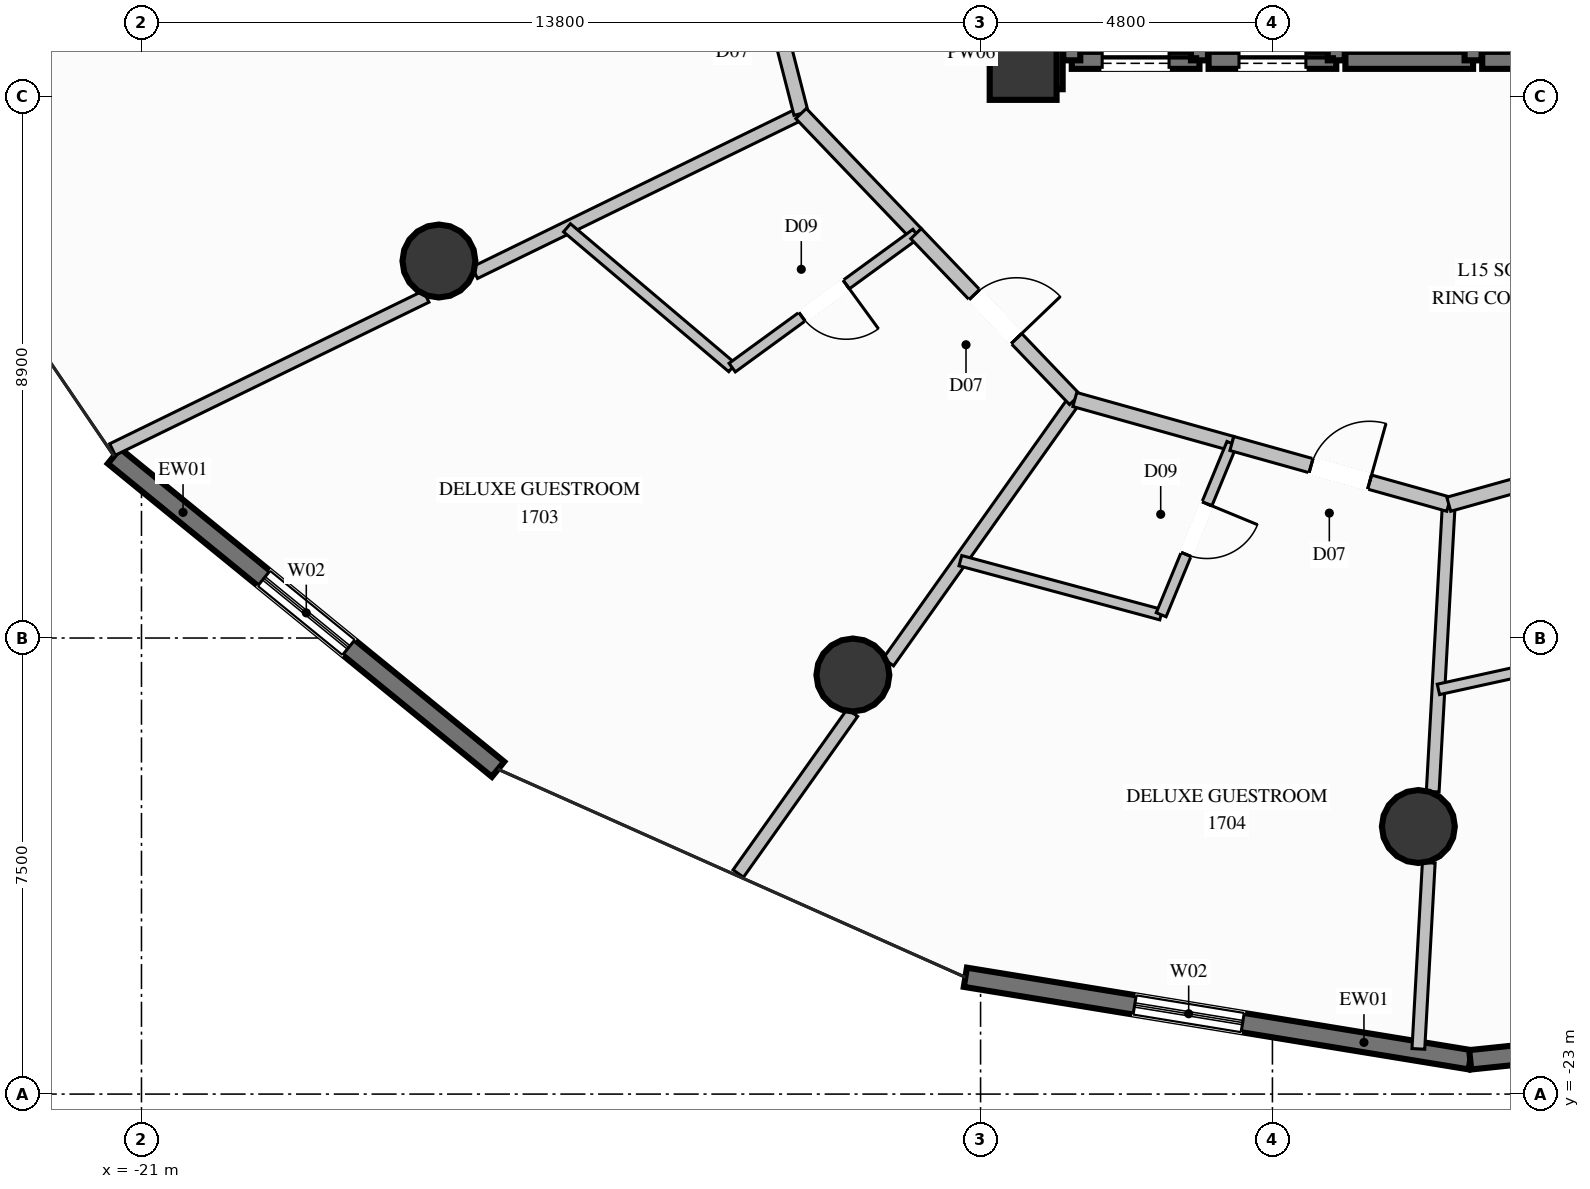
"""IFC4 building model, lengths in metres.
Left out: names, types, materials, properties, quantities, classifications, styles, units other than length and angle.
Written with IfcOpenShell. Run it as: python <this file> out.ifc"""

import sys

from ifc_helpers import new_model, si_unit, direction, frame, frame_2d, origin, origin_2d, place, context, subcontext, project, spatial, rectangle, circle, extrude, element, fill, save


model = new_model("IFC4")
c1 = context("Model", 3, precision=1e-05, world=origin(), true_north=direction((0.0, 1.0)))
c2 = subcontext(c1, "Body", "Model", "MODEL_VIEW")
j1 = project(units=[si_unit("LENGTHUNIT", "METRE"), si_unit("PLANEANGLEUNIT", "RADIAN")], contexts=[c1])
p1 = place(None, origin())
s1 = spatial("IfcSite", under=j1, at=p1, CompositionType="ELEMENT")
p2 = place(p1, origin())
s2 = spatial("IfcBuilding", under=s1, at=p2, CompositionType="ELEMENT")
p3 = place(p2, frame((0.0, 0.0, 64.4)))
s3 = spatial("IfcBuildingStorey", under=s2, at=p3, CompositionType="ELEMENT", Elevation=64.4)
p4 = place(p3, frame((-6.5, -6.1, 0.0), z_axis=(0.0, 0.0, 1.0), x_axis=(1.0, 0.0, 0.0)))
e1 = element("IfcColumn", 1, at=p4, inside=s3, PredefinedType="COLUMN", context=c2, shape_type="SweptSolid", body=[
    extrude(rectangle(XDim=1.1, YDim=1.1, at=origin_2d()), origin(), (0.0, 0.0, 1.0), 3.6),
])
p5 = place(p3, frame((-6.125, -6.1, 0.0), z_axis=(0.0, 0.0, 1.0), x_axis=(1.0, 0.0, 0.0)))
e2 = element("IfcWall", 2, at=p5, inside=s3, PredefinedType="SHEAR", context=c2, shape_type="SweptSolid", body=[
    extrude(rectangle(XDim=0.275, YDim=0.75, at=frame_2d((0.137, 0.0))), origin(), (0.0, 0.0, 1.0), 3.6),
])
p6 = place(p3, frame((-6.5, -6.475, 0.0), z_axis=(0.0, 0.0, 1.0), x_axis=(0.0, 1.0, 0.0)))
e3 = element("IfcWall", 3, at=p6, inside=s3, PredefinedType="SHEAR", context=c2, shape_type="SweptSolid", body=[
    extrude(rectangle(XDim=3.125, YDim=0.75, at=frame_2d((1.562, 0.0))), origin(), (0.0, 0.0, 1.0), 3.6),
])
for number, where, z_axis, x_axis in (
    (4, (-16.108, -9.3, 0.0), (0.0, 0.0, 1.0), (1.0, 0.0, 0.0)),
    (5, (-9.3, -16.108, 0.0), (0.0, 0.0, 1.0), (1.0, 0.0, 0.0)),
    (6, (0.0, -18.6, 0.0), (0.0, 0.0, 1.0), (1.0, 0.0, 0.0)),
):
    element("IfcColumn", number, at=place(p3, frame(where, z_axis=z_axis, x_axis=x_axis)), inside=s3, PredefinedType="COLUMN", context=c2, shape_type="SweptSolid", body=[
        extrude(circle(Radius=0.6, at=origin_2d()), origin(), (0.0, 0.0, 1.0), 3.6),
    ])
p7 = place(p3, frame((-15.136, -17.658, 0.0), z_axis=(0.0, 0.0, 1.0), x_axis=(-0.775018687806, 0.631938314673, 0.0)))
e7 = element("IfcWall", 7, at=p7, inside=s3, PredefinedType="SOLIDWALL", context=c2, shape_type="SweptSolid", body=[
    extrude(rectangle(XDim=8.149, YDim=0.32, at=frame_2d((4.075, 0.0))), origin(), (0.0, 0.0, 1.0), 3.34),
])
p8 = place(p7, frame((3.169, 0.0, 0.35)))
e8 = element("IfcOpeningElement", 8, at=p8, cuts=e7, PredefinedType="OPENING", context=c2, shape_type="SweptSolid", body=[
    extrude(rectangle(XDim=1.8, YDim=2.6, at=frame_2d((0.9, 1.3))), frame((0.0, 0.17, 0.0), z_axis=(0.0, -1.0, 0.0), x_axis=(1.0, 0.0, 0.0)), (0.0, 0.0, 1.0), 0.34),
])
p9 = place(p3, frame((0.853, -22.436, 0.0), z_axis=(0.0, 0.0, 1.0), x_axis=(-0.986907440065, 0.161287645973, 0.0)))
e9 = element("IfcWall", 9, at=p9, inside=s3, PredefinedType="SOLIDWALL", context=c2, shape_type="SweptSolid", body=[
    extrude(rectangle(XDim=8.413, YDim=0.32, at=frame_2d((4.207, 0.0))), origin(), (0.0, 0.0, 1.0), 3.34),
])
p10 = place(p9, frame((3.792, 0.0, 0.35)))
e10 = element("IfcOpeningElement", 10, at=p10, cuts=e9, PredefinedType="OPENING", context=c2, shape_type="SweptSolid", body=[
    extrude(rectangle(XDim=1.8, YDim=2.6, at=frame_2d((0.9, 1.3))), frame((0.0, 0.17, 0.0), z_axis=(0.0, -1.0, 0.0), x_axis=(1.0, 0.0, 0.0)), (0.0, 0.0, 1.0), 0.34),
])
p11 = place(p3, frame((8.959, -21.598, 0.0), z_axis=(0.0, 0.0, 1.0), x_axis=(-0.994696973701, -0.102849066644, 0.0)))
e11 = element("IfcWall", 11, at=p11, inside=s3, PredefinedType="SOLIDWALL", context=c2, shape_type="SweptSolid", body=[
    extrude(rectangle(XDim=8.149, YDim=0.32, at=frame_2d((4.075, 0.0))), origin(), (0.0, 0.0, 1.0), 3.34),
])
p12 = place(p11, frame((3.175, 0.0, 0.35)))
e12 = element("IfcOpeningElement", 12, at=p12, cuts=e11, PredefinedType="OPENING", context=c2, shape_type="SweptSolid", body=[
    extrude(rectangle(XDim=1.8, YDim=2.6, at=frame_2d((0.9, 1.3))), frame((0.0, 0.17, 0.0), z_axis=(0.0, -1.0, 0.0), x_axis=(1.0, 0.0, 0.0)), (0.0, 0.0, 1.0), 0.34),
])
p13 = place(p3, frame((-5.7, -6.0, 0.0), z_axis=(0.0, 0.0, 1.0), x_axis=(1.0, 0.0, 0.0)))
e13 = element("IfcWall", 13, at=p13, inside=s3, PredefinedType="SOLIDWALL", context=c2, shape_type="SweptSolid", body=[
    extrude(rectangle(XDim=2.1, YDim=0.28, at=frame_2d((1.05, 0.0))), origin(), (0.0, 0.0, 1.0), 3.34),
])
p14 = place(p13, frame((0.5, 0.0, 0.0)))
e14 = element("IfcOpeningElement", 14, at=p14, cuts=e13, PredefinedType="OPENING", context=c2, shape_type="SweptSolid", body=[
    extrude(rectangle(XDim=1.1, YDim=2.2, at=frame_2d((0.55, 1.1))), frame((0.0, 0.15, 0.0), z_axis=(0.0, -1.0, 0.0), x_axis=(1.0, 0.0, 0.0)), (0.0, 0.0, 1.0), 0.3),
])
for number, where, z_axis, x_axis in (
    (15, (-5.7, -3.5, 0.0), (0.0, 0.0, 1.0), (0.0, -1.0, 0.0)),
    (16, (-3.6, -6.0, 0.0), (0.0, 0.0, 1.0), (0.0, 1.0, 0.0)),
):
    element("IfcWall", number, at=place(p3, frame(where, z_axis=z_axis, x_axis=x_axis)), inside=s3, PredefinedType="SOLIDWALL", context=c2, shape_type="SweptSolid", body=[
        extrude(rectangle(XDim=2.5, YDim=0.28, at=frame_2d((1.25, 0.0))), origin(), (0.0, 0.0, 1.0), 3.34),
    ])
p15 = place(p3, frame((-3.45, -6.0, 0.0), z_axis=(0.0, 0.0, 1.0), x_axis=(1.0, 0.0, 0.0)))
e17 = element("IfcWall", 17, at=p15, inside=s3, PredefinedType="SOLIDWALL", context=c2, shape_type="SweptSolid", body=[
    extrude(rectangle(XDim=2.1, YDim=0.28, at=frame_2d((1.05, 0.0))), origin(), (0.0, 0.0, 1.0), 3.34),
])
p16 = place(p15, frame((0.5, 0.0, 0.0)))
e18 = element("IfcOpeningElement", 18, at=p16, cuts=e17, PredefinedType="OPENING", context=c2, shape_type="SweptSolid", body=[
    extrude(rectangle(XDim=1.1, YDim=2.2, at=frame_2d((0.55, 1.1))), frame((0.0, 0.15, 0.0), z_axis=(0.0, -1.0, 0.0), x_axis=(1.0, 0.0, 0.0)), (0.0, 0.0, 1.0), 0.3),
])
p17 = place(p3, frame((-1.35, -6.0, 0.0), z_axis=(0.0, 0.0, 1.0), x_axis=(0.0, 1.0, 0.0)))
e19 = element("IfcWall", 19, at=p17, inside=s3, PredefinedType="SOLIDWALL", context=c2, shape_type="SweptSolid", body=[
    extrude(rectangle(XDim=2.5, YDim=0.28, at=frame_2d((1.25, 0.0))), origin(), (0.0, 0.0, 1.0), 3.34),
])
p18 = place(p3, frame((-1.2, -6.0, 0.0), z_axis=(0.0, 0.0, 1.0), x_axis=(1.0, 0.0, 0.0)))
e20 = element("IfcWall", 20, at=p18, inside=s3, PredefinedType="SOLIDWALL", context=c2, shape_type="SweptSolid", body=[
    extrude(rectangle(XDim=2.1, YDim=0.28, at=frame_2d((1.05, 0.0))), origin(), (0.0, 0.0, 1.0), 3.34),
])
p19 = place(p3, frame((0.9, -6.0, 0.0), z_axis=(0.0, 0.0, 1.0), x_axis=(0.0, 1.0, 0.0)))
e21 = element("IfcWall", 21, at=p19, inside=s3, PredefinedType="SOLIDWALL", context=c2, shape_type="SweptSolid", body=[
    extrude(rectangle(XDim=2.5, YDim=0.28, at=frame_2d((1.25, 0.0))), origin(), (0.0, 0.0, 1.0), 3.34),
])
p20 = place(p3, frame((1.05, -6.0, 0.0), z_axis=(0.0, 0.0, 1.0), x_axis=(1.0, 0.0, 0.0)))
e22 = element("IfcWall", 22, at=p20, inside=s3, PredefinedType="SOLIDWALL", context=c2, shape_type="SweptSolid", body=[
    extrude(rectangle(XDim=2.1, YDim=0.28, at=frame_2d((1.05, 0.0))), origin(), (0.0, 0.0, 1.0), 3.34),
])
p21 = place(p3, frame((-10.152, -6.875, 0.0), z_axis=(0.0, 0.0, 1.0), x_axis=(-0.898775125454, -0.438409938145, 0.0)))
e23 = element("IfcWall", 23, at=p21, inside=s3, PredefinedType="PARTITIONING", context=c2, shape_type="SweptSolid", body=[
    extrude(rectangle(XDim=5.971, YDim=0.21, at=frame_2d((2.986, 0.0))), origin(), (0.0, 0.0, 1.0), 2.708),
])
p22 = place(p3, frame((-16.318, -9.883, 0.0), z_axis=(0.0, 0.0, 1.0), x_axis=(-0.898748415115, -0.438464692226, 0.0)))
e24 = element("IfcWall", 24, at=p22, inside=s3, PredefinedType="PARTITIONING", context=c2, shape_type="SweptSolid", body=[
    extrude(rectangle(XDim=5.74, YDim=0.21, at=frame_2d((2.87, 0.0))), origin(), (0.0, 0.0, 1.0), 3.34),
])
p23 = place(p3, frame((-5.65, -11.578, 0.0), z_axis=(0.0, 0.0, 1.0), x_axis=(-0.578995149059, -0.815330986389, 0.0)))
e25 = element("IfcWall", 25, at=p23, inside=s3, PredefinedType="PARTITIONING", context=c2, shape_type="SweptSolid", body=[
    extrude(rectangle(XDim=5.297, YDim=0.21, at=frame_2d((2.649, 0.0))), origin(), (0.0, 0.0, 1.0), 2.708),
])
p24 = place(p3, frame((-9.307, -16.728, 0.0), z_axis=(0.0, 0.0, 1.0), x_axis=(-0.578964948961, -0.815352431697, 0.0)))
e26 = element("IfcWall", 26, at=p24, inside=s3, PredefinedType="PARTITIONING", context=c2, shape_type="SweptSolid", body=[
    extrude(rectangle(XDim=3.244, YDim=0.21, at=frame_2d((1.622, 0.0))), origin(), (0.0, 0.0, 1.0), 3.34),
])
p25 = place(p3, frame((0.5, -13.3, 0.0), z_axis=(0.0, 0.0, 1.0), x_axis=(-0.05574419663, -0.998445083388, 0.0)))
e27 = element("IfcWall", 27, at=p25, inside=s3, PredefinedType="PARTITIONING", context=c2, shape_type="SweptSolid", body=[
    extrude(rectangle(XDim=4.734, YDim=0.21, at=frame_2d((2.367, 0.0))), origin(), (0.0, 0.0, 1.0), 3.34),
])
p26 = place(p3, frame((0.171, -19.196, 0.0), z_axis=(0.0, 0.0, 1.0), x_axis=(-0.055743466812, -0.998445124134, 0.0)))
e28 = element("IfcWall", 28, at=p26, inside=s3, PredefinedType="PARTITIONING", context=c2, shape_type="SweptSolid", body=[
    extrude(rectangle(XDim=3.066, YDim=0.21, at=frame_2d((1.533, 0.0))), origin(), (0.0, 0.0, 1.0), 3.34),
])
p27 = place(p3, frame((-11.108, -3.148, 0.0), z_axis=(0.0, 0.0, 1.0), x_axis=(0.248413515056, -0.9686540794, 0.0)))
e29 = element("IfcWall", 29, at=p27, inside=s3, PredefinedType="PARTITIONING", context=c2, shape_type="SweptSolid", body=[
    extrude(rectangle(XDim=3.848, YDim=0.24, at=frame_2d((1.924, 0.0))), origin(), (0.0, 0.0, 1.0), 3.34),
])
p28 = place(p27, frame((1.424, 0.0, 0.0)))
e30 = element("IfcOpeningElement", 30, at=p28, cuts=e29, PredefinedType="OPENING", context=c2, shape_type="SweptSolid", body=[
    extrude(rectangle(XDim=1.0, YDim=2.2, at=frame_2d((0.5, 1.1))), frame((0.0, 0.13, 0.0), z_axis=(0.0, -1.0, 0.0), x_axis=(1.0, 0.0, 0.0)), (0.0, 0.0, 1.0), 0.26),
])
p29 = place(p3, frame((-10.152, -6.875, 0.0), z_axis=(0.0, 0.0, 1.0), x_axis=(0.691583392139, -0.722296623083, 0.0)))
e31 = element("IfcWall", 31, at=p29, inside=s3, PredefinedType="PARTITIONING", context=c2, shape_type="SweptSolid", body=[
    extrude(rectangle(XDim=2.734, YDim=0.24, at=frame_2d((1.367, 0.0))), origin(), (0.0, 0.0, 1.0), 3.34),
])
p30 = place(p3, frame((-14.002, -8.754, 0.0), z_axis=(0.0, 0.0, 1.0), x_axis=(0.763381081672, -0.64594839124, 0.0)))
e32 = element("IfcWall", 32, at=p30, inside=s3, PredefinedType="PLUMBINGWALL", context=c2, shape_type="SweptSolid", body=[
    extrude(rectangle(XDim=3.559, YDim=0.175, at=frame_2d((1.78, 0.0))), origin(), (0.0, 0.0, 1.0), 3.34),
])
p31 = place(p3, frame((-8.261, -8.85, 0.0), z_axis=(0.0, 0.0, 1.0), x_axis=(-0.8082702151, -0.588811735092, 0.0)))
e33 = element("IfcWall", 33, at=p31, inside=s3, PredefinedType="PLUMBINGWALL", context=c2, shape_type="SweptSolid", body=[
    extrude(rectangle(XDim=3.741, YDim=0.175, at=frame_2d((1.871, 0.0))), origin(), (0.0, 0.0, 1.0), 3.34),
])
p32 = place(p31, frame((1.421, 0.0, 0.0)))
e34 = element("IfcOpeningElement", 34, at=p32, cuts=e33, PredefinedType="OPENING", context=c2, shape_type="SweptSolid", body=[
    extrude(rectangle(XDim=0.9, YDim=2.1, at=frame_2d((0.45, 1.05))), frame((0.0, 0.098, 0.0), z_axis=(0.0, -1.0, 0.0), x_axis=(1.0, 0.0, 0.0)), (0.0, 0.0, 1.0), 0.195),
])
p33 = place(p3, frame((-8.261, -8.85, 0.0), z_axis=(0.0, 0.0, 1.0), x_axis=(0.691485368968, -0.722390465402, 0.0)))
e35 = element("IfcWall", 35, at=p33, inside=s3, PredefinedType="PARTITIONING", context=c2, shape_type="SweptSolid", body=[
    extrude(rectangle(XDim=3.776, YDim=0.24, at=frame_2d((1.888, 0.0))), origin(), (0.0, 0.0, 1.0), 3.34),
])
p34 = place(p33, frame((1.388, 0.0, 0.0)))
e36 = element("IfcOpeningElement", 36, at=p34, cuts=e35, PredefinedType="OPENING", context=c2, shape_type="SweptSolid", body=[
    extrude(rectangle(XDim=1.0, YDim=2.2, at=frame_2d((0.5, 1.1))), frame((0.0, 0.13, 0.0), z_axis=(0.0, -1.0, 0.0), x_axis=(1.0, 0.0, 0.0)), (0.0, 0.0, 1.0), 0.26),
])
p35 = place(p3, frame((-5.65, -11.578, 0.0), z_axis=(0.0, 0.0, 1.0), x_axis=(0.96297347206, -0.269596164862, 0.0)))
e37 = element("IfcWall", 37, at=p35, inside=s3, PredefinedType="PARTITIONING", context=c2, shape_type="SweptSolid", body=[
    extrude(rectangle(XDim=2.682, YDim=0.24, at=frame_2d((1.341, 0.0))), origin(), (0.0, 0.0, 1.0), 2.917),
])
p36 = place(p3, frame((-7.532, -14.228, 0.0), z_axis=(0.0, 0.0, 1.0), x_axis=(0.965621962254, -0.259950429913, 0.0)))
e38 = element("IfcWall", 38, at=p36, inside=s3, PredefinedType="PLUMBINGWALL", context=c2, shape_type="SweptSolid", body=[
    extrude(rectangle(XDim=3.42, YDim=0.175, at=frame_2d((1.71, 0.0))), origin(), (0.0, 0.0, 1.0), 3.34),
])
p37 = place(p3, frame((-3.067, -12.301, 0.0), z_axis=(0.0, 0.0, 1.0), x_axis=(-0.381757178114, -0.924262655828, 0.0)))
e39 = element("IfcWall", 39, at=p37, inside=s3, PredefinedType="PLUMBINGWALL", context=c2, shape_type="SweptSolid", body=[
    extrude(rectangle(XDim=3.047, YDim=0.175, at=frame_2d((1.523, 0.0))), origin(), (0.0, 0.0, 1.0), 3.34),
])
p38 = place(p37, frame((1.073, 0.0, 0.0)))
e40 = element("IfcOpeningElement", 40, at=p38, cuts=e39, PredefinedType="OPENING", context=c2, shape_type="SweptSolid", body=[
    extrude(rectangle(XDim=0.9, YDim=2.1, at=frame_2d((0.45, 1.05))), frame((0.0, 0.098, 0.0), z_axis=(0.0, -1.0, 0.0), x_axis=(1.0, 0.0, 0.0)), (0.0, 0.0, 1.0), 0.195),
])
p39 = place(p3, frame((-3.067, -12.301, 0.0), z_axis=(0.0, 0.0, 1.0), x_axis=(0.962943481199, -0.269703266603, 0.0)))
e41 = element("IfcWall", 41, at=p39, inside=s3, PredefinedType="PARTITIONING", context=c2, shape_type="SweptSolid", body=[
    extrude(rectangle(XDim=3.704, YDim=0.24, at=frame_2d((1.852, 0.0))), origin(), (0.0, 0.0, 1.0), 2.917),
])
p40 = place(p39, frame((1.352, 0.0, 0.0)))
e42 = element("IfcOpeningElement", 42, at=p40, cuts=e41, PredefinedType="OPENING", context=c2, shape_type="SweptSolid", body=[
    extrude(rectangle(XDim=1.0, YDim=2.2, at=frame_2d((0.5, 1.1))), frame((0.0, 0.13, 0.0), z_axis=(0.0, -1.0, 0.0), x_axis=(1.0, 0.0, 0.0)), (0.0, 0.0, 1.0), 0.26),
])
p41 = place(p3, frame((0.5, -13.3, 0.0), z_axis=(0.0, 0.0, 1.0), x_axis=(0.96297347206, 0.269596164862, 0.0)))
e43 = element("IfcWall", 43, at=p41, inside=s3, PredefinedType="PARTITIONING", context=c2, shape_type="SweptSolid", body=[
    extrude(rectangle(XDim=2.682, YDim=0.24, at=frame_2d((1.341, 0.0))), origin(), (0.0, 0.0, 1.0), 3.34),
])
p42 = place(p3, frame((0.33, -16.345, 0.0), z_axis=(0.0, 0.0, 1.0), x_axis=(0.976706198213, 0.21458099257, 0.0)))
e44 = element("IfcWall", 44, at=p42, inside=s3, PredefinedType="PLUMBINGWALL", context=c2, shape_type="SweptSolid", body=[
    extrude(rectangle(XDim=3.467, YDim=0.175, at=frame_2d((1.733, 0.0))), origin(), (0.0, 0.0, 1.0), 3.34),
])
p43 = place(p8, origin())
e45 = element("IfcWindow", 45, at=p43, inside=s3, PartitioningType="SINGLE_PANEL", PredefinedType="WINDOW", context=c2, shape_type="SweptSolid", body=[
    extrude(rectangle(XDim=1.8, YDim=2.6, at=frame_2d((0.9, 1.3))), frame((0.0, 0.03, 0.0), z_axis=(0.0, -1.0, 0.0), x_axis=(1.0, 0.0, 0.0)), (0.0, 0.0, 1.0), 0.06),
])
fill(e8, e45)
p44 = place(p10, origin())
e46 = element("IfcWindow", 46, at=p44, inside=s3, PartitioningType="SINGLE_PANEL", PredefinedType="WINDOW", context=c2, shape_type="SweptSolid", body=[
    extrude(rectangle(XDim=1.8, YDim=2.6, at=frame_2d((0.9, 1.3))), frame((0.0, 0.03, 0.0), z_axis=(0.0, -1.0, 0.0), x_axis=(1.0, 0.0, 0.0)), (0.0, 0.0, 1.0), 0.06),
])
fill(e10, e46)
p45 = place(p14, origin())
e47 = element("IfcDoor", 47, at=p45, inside=s3, OperationType="SLIDING_TO_LEFT", PredefinedType="DOOR", context=c2, shape_type="SweptSolid", body=[
    extrude(rectangle(XDim=1.1, YDim=2.2, at=frame_2d((0.55, 1.1))), frame((0.0, 0.025, 0.0), z_axis=(0.0, -1.0, 0.0), x_axis=(1.0, 0.0, 0.0)), (0.0, 0.0, 1.0), 0.05),
])
fill(e14, e47)
p46 = place(p16, origin())
e48 = element("IfcDoor", 48, at=p46, inside=s3, OperationType="SLIDING_TO_LEFT", PredefinedType="DOOR", context=c2, shape_type="SweptSolid", body=[
    extrude(rectangle(XDim=1.1, YDim=2.2, at=frame_2d((0.55, 1.1))), frame((0.0, 0.025, 0.0), z_axis=(0.0, -1.0, 0.0), x_axis=(1.0, 0.0, 0.0)), (0.0, 0.0, 1.0), 0.05),
])
fill(e18, e48)
p47 = place(p32, origin())
e49 = element("IfcDoor", 49, at=p47, inside=s3, OperationType="SINGLE_SWING_LEFT", PredefinedType="DOOR", context=c2, shape_type="SweptSolid", body=[
    extrude(rectangle(XDim=0.9, YDim=2.1, at=frame_2d((0.45, 1.05))), frame((0.0, 0.025, 0.0), z_axis=(0.0, -1.0, 0.0), x_axis=(1.0, 0.0, 0.0)), (0.0, 0.0, 1.0), 0.05),
])
fill(e34, e49)
p48 = place(p34, origin())
e50 = element("IfcDoor", 50, at=p48, inside=s3, OperationType="SINGLE_SWING_RIGHT", PredefinedType="DOOR", context=c2, shape_type="SweptSolid", body=[
    extrude(rectangle(XDim=1.0, YDim=2.2, at=frame_2d((0.5, 1.1))), frame((0.0, 0.025, 0.0), z_axis=(0.0, -1.0, 0.0), x_axis=(1.0, 0.0, 0.0)), (0.0, 0.0, 1.0), 0.05),
])
fill(e36, e50)
p49 = place(p38, origin())
e51 = element("IfcDoor", 51, at=p49, inside=s3, OperationType="SINGLE_SWING_LEFT", PredefinedType="DOOR", context=c2, shape_type="SweptSolid", body=[
    extrude(rectangle(XDim=0.9, YDim=2.1, at=frame_2d((0.45, 1.05))), frame((0.0, 0.025, 0.0), z_axis=(0.0, -1.0, 0.0), x_axis=(1.0, 0.0, 0.0)), (0.0, 0.0, 1.0), 0.05),
])
fill(e40, e51)
p50 = place(p40, origin())
e52 = element("IfcDoor", 52, at=p50, inside=s3, OperationType="SINGLE_SWING_RIGHT", PredefinedType="DOOR", context=c2, shape_type="SweptSolid", body=[
    extrude(rectangle(XDim=1.0, YDim=2.2, at=frame_2d((0.5, 1.1))), frame((0.0, 0.025, 0.0), z_axis=(0.0, -1.0, 0.0), x_axis=(1.0, 0.0, 0.0)), (0.0, 0.0, 1.0), 0.05),
])
fill(e42, e52)
save(model, sys.argv[1])
